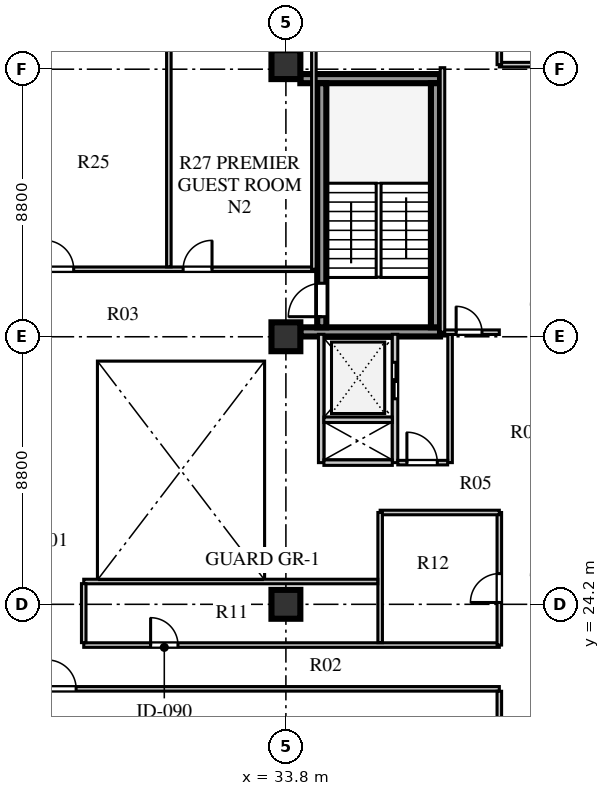
"""IFC4 building model, lengths in metres.
Left out: names, types, materials, properties, quantities, classifications, styles, units other than length and angle.
Written with IfcOpenShell. Run it as: python <this file> out.ifc"""

import sys

from ifc_helpers import new_model, si_unit, direction, frame, frame_2d, origin, origin_2d, place, context, subcontext, project, spatial, rectangle, extrude, element, fill, save


model = new_model("IFC4")
c1 = context("Model", 3, precision=1e-05, world=origin(), true_north=direction((0.0, 1.0)))
c2 = subcontext(c1, "Body", "Model", "MODEL_VIEW")
j1 = project(units=[si_unit("LENGTHUNIT", "METRE"), si_unit("PLANEANGLEUNIT", "RADIAN")], contexts=[c1])
p1 = place(None, origin())
s1 = spatial("IfcSite", under=j1, at=p1, CompositionType="ELEMENT")
p2 = place(p1, origin())
s2 = spatial("IfcBuilding", under=s1, at=p2, CompositionType="ELEMENT")
p3 = place(p2, frame((0.0, 0.0, 196.4)))
s3 = spatial("IfcBuildingStorey", under=s2, at=p3, CompositionType="ELEMENT", Elevation=196.4)
for number, where, z_axis, x_axis in (
    (1, (34.275, 33.16, 0.0), (0.0, 0.0, 1.0), (1.0, 0.0, 0.0)),
    (2, (34.275, 41.49, 0.0), (0.0, 0.0, 1.0), (1.0, 0.0, 0.0)),
):
    element("IfcWall", number, at=place(p3, frame(where, z_axis=z_axis, x_axis=x_axis)), inside=s3, PredefinedType="SHEAR", context=c2, shape_type="SweptSolid", body=[
        extrude(rectangle(XDim=4.595, YDim=0.3, at=frame_2d((2.298, 0.0))), origin(), (0.0, 0.0, 1.0), 3.6),
    ])
p4 = place(p3, frame((34.98, 33.31, 0.0), z_axis=(0.0, 0.0, 1.0), x_axis=(0.0, 1.0, 0.0)))
e3 = element("IfcWall", 3, at=p4, inside=s3, PredefinedType="SHEAR", context=c2, shape_type="SweptSolid", body=[
    extrude(rectangle(XDim=8.03, YDim=0.3, at=frame_2d((4.015, 0.0))), origin(), (0.0, 0.0, 1.0), 3.6),
])
p5 = place(p4, frame((0.35, 0.0, 0.0)))
e4 = element("IfcOpeningElement", 4, at=p5, cuts=e3, PredefinedType="OPENING", context=c2, shape_type="SweptSolid", body=[
    extrude(rectangle(XDim=1.1, YDim=2.1, at=frame_2d((0.55, 1.05))), frame((0.0, 0.16, 0.0), z_axis=(0.0, -1.0, 0.0), x_axis=(1.0, 0.0, 0.0)), (0.0, 0.0, 1.0), 0.32),
])
p6 = place(p3, frame((38.72, 33.31, 0.0), z_axis=(0.0, 0.0, 1.0), x_axis=(0.0, 1.0, 0.0)))
e5 = element("IfcWall", 5, at=p6, inside=s3, PredefinedType="SHEAR", context=c2, shape_type="SweptSolid", body=[
    extrude(rectangle(XDim=8.03, YDim=0.3, at=frame_2d((4.015, 0.0))), origin(), (0.0, 0.0, 1.0), 3.6),
])
for number, where, z_axis, x_axis in (
    (6, (33.8, 24.2, 0.0), (0.0, 0.0, 1.0), (1.0, 0.0, 0.0)),
    (7, (33.8, 33.0, 0.0), (0.0, 0.0, 1.0), (1.0, 0.0, 0.0)),
    (8, (33.8, 41.95, 0.0), (0.0, 0.0, 1.0), (1.0, 0.0, 0.0)),
):
    element("IfcColumn", number, at=place(p3, frame(where, z_axis=z_axis, x_axis=x_axis)), inside=s3, PredefinedType="COLUMN", context=c2, shape_type="SweptSolid", body=[
        extrude(rectangle(XDim=0.95, YDim=0.95, at=origin_2d()), origin(), (0.0, 0.0, 1.0), 3.6),
    ])
p7 = place(p3, frame((34.96, 28.86, 0.0), z_axis=(0.0, 0.0, 1.0), x_axis=(0.0, 1.0, 0.0)))
e9 = element("IfcWall", 9, at=p7, inside=s3, PredefinedType="SOLIDWALL", context=c2, shape_type="SweptSolid", body=[
    extrude(rectangle(XDim=4.22, YDim=0.18, at=frame_2d((2.11, 0.0))), origin(), (0.0, 0.0, 1.0), 3.6),
])
p8 = place(p3, frame((37.39, 28.86, 0.0), z_axis=(0.0, 0.0, 1.0), x_axis=(0.0, 1.0, 0.0)))
e10 = element("IfcWall", 10, at=p8, inside=s3, PredefinedType="SOLIDWALL", context=c2, shape_type="SweptSolid", body=[
    extrude(rectangle(XDim=4.22, YDim=0.18, at=frame_2d((2.11, 0.0))), origin(), (0.0, 0.0, 1.0), 3.6),
])
p9 = place(p8, frame((2.1, 0.0, 0.0)))
e11 = element("IfcOpeningElement", 11, at=p9, cuts=e10, PredefinedType="OPENING", context=c2, shape_type="SweptSolid", body=[
    extrude(rectangle(XDim=1.2, YDim=2.12, at=frame_2d((0.6, 1.06))), frame((0.0, 0.1, 0.0), z_axis=(0.0, -1.0, 0.0), x_axis=(1.0, 0.0, 0.0)), (0.0, 0.0, 1.0), 0.2),
])
for number, where, z_axis, x_axis in (
    (12, (35.05, 28.86, 0.0), (0.0, 0.0, 1.0), (1.0, 0.0, 0.0)),
    (13, (35.05, 30.27, 0.0), (0.0, 0.0, 1.0), (1.0, 0.0, 0.0)),
):
    element("IfcWall", number, at=place(p3, frame(where, z_axis=z_axis, x_axis=x_axis)), inside=s3, PredefinedType="SOLIDWALL", context=c2, shape_type="SweptSolid", body=[
        extrude(rectangle(XDim=2.25, YDim=0.18, at=frame_2d((1.125, 0.0))), origin(), (0.0, 0.0, 1.0), 3.6),
    ])
p10 = place(p3, frame((39.2, 28.86, 0.0), z_axis=(0.0, 0.0, 1.0), x_axis=(0.0, 1.0, 0.0)))
e14 = element("IfcWall", 14, at=p10, inside=s3, PredefinedType="PARTITIONING", context=c2, shape_type="SweptSolid", body=[
    extrude(rectangle(XDim=4.22, YDim=0.15, at=frame_2d((2.11, 0.0))), origin(), (0.0, 0.0, 1.0), 3.6),
])
p11 = place(p3, frame((37.48, 28.86, 0.0), z_axis=(0.0, 0.0, 1.0), x_axis=(1.0, 0.0, 0.0)))
e15 = element("IfcWall", 15, at=p11, inside=s3, PredefinedType="PARTITIONING", context=c2, shape_type="SweptSolid", body=[
    extrude(rectangle(XDim=1.64, YDim=0.15, at=frame_2d((0.82, 0.0))), origin(), (0.0, 0.0, 1.0), 3.6),
])
p12 = place(p11, frame((0.3, 0.0, 0.0)))
e16 = element("IfcOpeningElement", 16, at=p12, cuts=e15, PredefinedType="OPENING", context=c2, shape_type="SweptSolid", body=[
    extrude(rectangle(XDim=1.0, YDim=2.1, at=frame_2d((0.5, 1.05))), frame((0.0, 0.085, 0.0), z_axis=(0.0, -1.0, 0.0), x_axis=(1.0, 0.0, 0.0)), (0.0, 0.0, 1.0), 0.17),
])
p13 = place(p3, frame((25.22, 21.42, 0.0), z_axis=(0.0, 0.0, 1.0), x_axis=(1.0, 0.0, 0.0)))
e17 = element("IfcWall", 17, at=p13, inside=s3, PredefinedType="PARTITIONING", context=c2, shape_type="SweptSolid", body=[
    extrude(rectangle(XDim=15.6, YDim=0.15, at=frame_2d((7.8, 0.0))), origin(), (0.0, 0.0, 1.0), 3.25),
])
p14 = place(p13, frame((0.73, 0.0, 0.0)))
e18 = element("IfcOpeningElement", 18, at=p14, cuts=e17, PredefinedType="OPENING", context=c2, shape_type="SweptSolid", body=[
    extrude(rectangle(XDim=0.95, YDim=2.1, at=frame_2d((0.475, 1.05))), frame((0.0, 0.085, 0.0), z_axis=(0.0, -1.0, 0.0), x_axis=(1.0, 0.0, 0.0)), (0.0, 0.0, 1.0), 0.17),
])
p15 = place(p3, frame((27.15, 22.86, 0.0), z_axis=(0.0, 0.0, 1.0), x_axis=(1.0, 0.0, 0.0)))
e19 = element("IfcWall", 19, at=p15, inside=s3, PredefinedType="PARTITIONING", context=c2, shape_type="SweptSolid", body=[
    extrude(rectangle(XDim=13.67, YDim=0.15, at=frame_2d((6.835, 0.0))), origin(), (0.0, 0.0, 1.0), 3.6),
])
p16 = place(p15, frame((2.2, 0.0, 0.0)))
e20 = element("IfcOpeningElement", 20, at=p16, cuts=e19, PredefinedType="OPENING", context=c2, shape_type="SweptSolid", body=[
    extrude(rectangle(XDim=0.9, YDim=2.08, at=frame_2d((0.45, 1.04))), frame((0.0, 0.085, 0.0), z_axis=(0.0, -1.0, 0.0), x_axis=(1.0, 0.0, 0.0)), (0.0, 0.0, 1.0), 0.17),
])
p17 = place(p3, frame((25.22, 35.22, 0.0), z_axis=(0.0, 0.0, 1.0), x_axis=(1.0, 0.0, 0.0)))
e21 = element("IfcWall", 21, at=p17, inside=s3, PredefinedType="PARTITIONING", context=c2, shape_type="SweptSolid", body=[
    extrude(rectangle(XDim=9.5, YDim=0.15, at=frame_2d((4.75, 0.0))), origin(), (0.0, 0.0, 1.0), 3.6),
])
p18 = place(p17, frame((0.65, 0.0, 0.0)))
e22 = element("IfcOpeningElement", 22, at=p18, cuts=e21, PredefinedType="OPENING", context=c2, shape_type="SweptSolid", body=[
    extrude(rectangle(XDim=0.95, YDim=2.1, at=frame_2d((0.475, 1.05))), frame((0.0, 0.085, 0.0), z_axis=(0.0, -1.0, 0.0), x_axis=(1.0, 0.0, 0.0)), (0.0, 0.0, 1.0), 0.17),
])
p19 = place(p17, frame((5.2, 0.0, 0.0)))
e23 = element("IfcOpeningElement", 23, at=p19, cuts=e21, PredefinedType="OPENING", context=c2, shape_type="SweptSolid", body=[
    extrude(rectangle(XDim=0.95, YDim=2.1, at=frame_2d((0.475, 1.05))), frame((0.0, 0.085, 0.0), z_axis=(0.0, -1.0, 0.0), x_axis=(1.0, 0.0, 0.0)), (0.0, 0.0, 1.0), 0.17),
])
p20 = place(p3, frame((40.82, 41.95, 0.0), z_axis=(0.0, 0.0, 1.0), x_axis=(1.0, 0.0, 0.0)))
e24 = element("IfcWall", 24, at=p20, inside=s3, PredefinedType="PARTITIONING", context=c2, shape_type="SweptSolid", body=[
    extrude(rectangle(XDim=9.7, YDim=0.15, at=frame_2d((4.85, 0.0))), origin(), (0.0, 0.0, 1.0), 2.95),
])
p21 = place(p3, frame((40.82, 22.86, 0.0), z_axis=(0.0, 0.0, 1.0), x_axis=(0.0, 1.0, 0.0)))
e25 = element("IfcWall", 25, at=p21, inside=s3, PredefinedType="PARTITIONING", context=c2, shape_type="SweptSolid", body=[
    extrude(rectangle(XDim=4.36, YDim=0.15, at=frame_2d((2.18, 0.0))), origin(), (0.0, 0.0, 1.0), 3.6),
])
p22 = place(p21, frame((1.4, 0.0, 0.0)))
e26 = element("IfcOpeningElement", 26, at=p22, cuts=e25, PredefinedType="OPENING", context=c2, shape_type="SweptSolid", body=[
    extrude(rectangle(XDim=0.95, YDim=2.1, at=frame_2d((0.475, 1.05))), frame((0.0, 0.085, 0.0), z_axis=(0.0, -1.0, 0.0), x_axis=(1.0, 0.0, 0.0)), (0.0, 0.0, 1.0), 0.17),
])
p23 = place(p3, frame((36.9, 27.22, 0.0), z_axis=(0.0, 0.0, 1.0), x_axis=(1.0, 0.0, 0.0)))
e27 = element("IfcWall", 27, at=p23, inside=s3, PredefinedType="PARTITIONING", context=c2, shape_type="SweptSolid", body=[
    extrude(rectangle(XDim=3.92, YDim=0.15, at=frame_2d((1.96, 0.0))), origin(), (0.0, 0.0, 1.0), 3.25),
])
p24 = place(p3, frame((36.9, 22.94, 0.0), z_axis=(0.0, 0.0, 1.0), x_axis=(0.0, 1.0, 0.0)))
e28 = element("IfcWall", 28, at=p24, inside=s3, PredefinedType="PARTITIONING", context=c2, shape_type="SweptSolid", body=[
    extrude(rectangle(XDim=4.28, YDim=0.15, at=frame_2d((2.14, 0.0))), origin(), (0.0, 0.0, 1.0), 3.6),
])
p25 = place(p3, frame((27.15, 24.95, 0.0), z_axis=(0.0, 0.0, 1.0), x_axis=(1.0, 0.0, 0.0)))
e29 = element("IfcWall", 29, at=p25, inside=s3, PredefinedType="PARTITIONING", context=c2, shape_type="SweptSolid", body=[
    extrude(rectangle(XDim=9.67, YDim=0.15, at=frame_2d((4.835, 0.0))), origin(), (0.0, 0.0, 1.0), 3.05),
])
p26 = place(p3, frame((27.15, 22.94, 0.0), z_axis=(0.0, 0.0, 1.0), x_axis=(0.0, 1.0, 0.0)))
e30 = element("IfcWall", 30, at=p26, inside=s3, PredefinedType="PARTITIONING", context=c2, shape_type="SweptSolid", body=[
    extrude(rectangle(XDim=1.94, YDim=0.15, at=frame_2d((0.97, 0.0))), origin(), (0.0, 0.0, 1.0), 3.6),
])
p27 = place(p3, frame((40.82, 7.88, 0.0), z_axis=(0.0, 0.0, 1.0), x_axis=(0.0, 1.0, 0.0)))
e31 = element("IfcWall", 31, at=p27, inside=s3, PredefinedType="PARTITIONING", context=c2, shape_type="SweptSolid", body=[
    extrude(rectangle(XDim=13.46, YDim=0.15, at=frame_2d((6.73, 0.0))), origin(), (0.0, 0.0, 1.0), 3.6),
])
p28 = place(p3, frame((34.72, 35.22, 0.0), z_axis=(0.0, 0.0, 1.0), x_axis=(0.0, 1.0, 0.0)))
e32 = element("IfcWall", 32, at=p28, inside=s3, PredefinedType="PARTITIONING", context=c2, shape_type="SweptSolid", body=[
    extrude(rectangle(XDim=14.1, YDim=0.15, at=frame_2d((7.05, 0.0))), origin(), (0.0, 0.0, 1.0), 3.6),
])
p29 = place(p3, frame((29.95, 35.3, 0.0), z_axis=(0.0, 0.0, 1.0), x_axis=(0.0, 1.0, 0.0)))
e33 = element("IfcWall", 33, at=p29, inside=s3, PredefinedType="PARTITIONING", context=c2, shape_type="SweptSolid", body=[
    extrude(rectangle(XDim=14.02, YDim=0.15, at=frame_2d((7.01, 0.0))), origin(), (0.0, 0.0, 1.0), 3.6),
])
p30 = place(p3, frame((38.95, 33.15, 0.0), z_axis=(0.0, 0.0, 1.0), x_axis=(1.0, 0.0, 0.0)))
e34 = element("IfcWall", 34, at=p30, inside=s3, PredefinedType="PARTITIONING", context=c2, shape_type="SweptSolid", body=[
    extrude(rectangle(XDim=1.87, YDim=0.15, at=frame_2d((0.935, 0.0))), origin(), (0.0, 0.0, 1.0), 3.6),
])
p31 = place(p30, frame((0.45, 0.0, 0.0)))
e35 = element("IfcOpeningElement", 35, at=p31, cuts=e34, PredefinedType="OPENING", context=c2, shape_type="SweptSolid", body=[
    extrude(rectangle(XDim=0.85, YDim=2.05, at=frame_2d((0.425, 1.025))), frame((0.0, 0.085, 0.0), z_axis=(0.0, -1.0, 0.0), x_axis=(1.0, 0.0, 0.0)), (0.0, 0.0, 1.0), 0.17),
])
p32 = place(p3, frame((38.95, 33.15, 0.0), z_axis=(0.0, 0.0, 1.0), x_axis=(0.0, 1.0, 0.0)))
e36 = element("IfcWall", 36, at=p32, inside=s3, PredefinedType="PARTITIONING", context=c2, shape_type="SweptSolid", body=[
    extrude(rectangle(XDim=8.7, YDim=0.15, at=frame_2d((4.35, 0.0))), origin(), (0.0, 0.0, 1.0), 3.6),
])
p33 = place(p3, frame((40.82, 41.95, 0.0), z_axis=(0.0, 0.0, 1.0), x_axis=(0.0, 1.0, 0.0)))
e37 = element("IfcWall", 37, at=p33, inside=s3, PredefinedType="PARTITIONING", context=c2, shape_type="SweptSolid", body=[
    extrude(rectangle(XDim=7.37, YDim=0.15, at=frame_2d((3.685, 0.0))), origin(), (0.0, 0.0, 1.0), 3.6),
])
p34 = place(p5, origin())
e38 = element("IfcDoor", 38, at=p34, inside=s3, OperationType="SINGLE_SWING_LEFT", PredefinedType="DOOR", context=c2, shape_type="SweptSolid", body=[
    extrude(rectangle(XDim=1.1, YDim=2.1, at=frame_2d((0.55, 1.05))), frame((0.0, 0.025, 0.0), z_axis=(0.0, -1.0, 0.0), x_axis=(1.0, 0.0, 0.0)), (0.0, 0.0, 1.0), 0.05),
])
fill(e4, e38)
p35 = place(p9, frame((1.2, 0.0, 0.0), z_axis=(0.0, 0.0, 1.0), x_axis=(-1.0, 0.0, 0.0)))
e39 = element("IfcDoor", 39, at=p35, inside=s3, OperationType="DOUBLE_DOOR_SLIDING", PredefinedType="DOOR", context=c2, shape_type="SweptSolid", body=[
    extrude(rectangle(XDim=1.2, YDim=2.12, at=frame_2d((0.6, 1.06))), frame((0.0, 0.025, 0.0), z_axis=(0.0, -1.0, 0.0), x_axis=(1.0, 0.0, 0.0)), (0.0, 0.0, 1.0), 0.05),
])
fill(e11, e39)
p36 = place(p12, origin())
e40 = element("IfcDoor", 40, at=p36, inside=s3, OperationType="SINGLE_SWING_LEFT", PredefinedType="DOOR", context=c2, shape_type="SweptSolid", body=[
    extrude(rectangle(XDim=1.0, YDim=2.1, at=frame_2d((0.5, 1.05))), frame((0.0, 0.025, 0.0), z_axis=(0.0, -1.0, 0.0), x_axis=(1.0, 0.0, 0.0)), (0.0, 0.0, 1.0), 0.05),
])
fill(e16, e40)
p37 = place(p16, origin())
e41 = element("IfcDoor", 41, at=p37, inside=s3, OperationType="SINGLE_SWING_LEFT", PredefinedType="DOOR", context=c2, shape_type="SweptSolid", body=[
    extrude(rectangle(XDim=0.9, YDim=2.08, at=frame_2d((0.45, 1.04))), frame((0.0, 0.025, 0.0), z_axis=(0.0, -1.0, 0.0), x_axis=(1.0, 0.0, 0.0)), (0.0, 0.0, 1.0), 0.05),
])
fill(e20, e41)
p38 = place(p22, frame((0.95, 0.0, 0.0), z_axis=(0.0, 0.0, 1.0), x_axis=(-1.0, 0.0, 0.0)))
e42 = element("IfcDoor", 42, at=p38, inside=s3, OperationType="SINGLE_SWING_RIGHT", PredefinedType="DOOR", context=c2, shape_type="SweptSolid", body=[
    extrude(rectangle(XDim=0.95, YDim=2.1, at=frame_2d((0.475, 1.05))), frame((0.0, 0.025, 0.0), z_axis=(0.0, -1.0, 0.0), x_axis=(1.0, 0.0, 0.0)), (0.0, 0.0, 1.0), 0.05),
])
fill(e26, e42)
p39 = place(p14, frame((0.95, 0.0, 0.0), z_axis=(0.0, 0.0, 1.0), x_axis=(-1.0, 0.0, 0.0)))
e43 = element("IfcDoor", 43, at=p39, inside=s3, OperationType="SINGLE_SWING_RIGHT", PredefinedType="DOOR", context=c2, shape_type="SweptSolid", body=[
    extrude(rectangle(XDim=0.95, YDim=2.1, at=frame_2d((0.475, 1.05))), frame((0.0, 0.025, 0.0), z_axis=(0.0, -1.0, 0.0), x_axis=(1.0, 0.0, 0.0)), (0.0, 0.0, 1.0), 0.05),
])
fill(e18, e43)
p40 = place(p18, origin())
e44 = element("IfcDoor", 44, at=p40, inside=s3, OperationType="SINGLE_SWING_LEFT", PredefinedType="DOOR", context=c2, shape_type="SweptSolid", body=[
    extrude(rectangle(XDim=0.95, YDim=2.1, at=frame_2d((0.475, 1.05))), frame((0.0, 0.025, 0.0), z_axis=(0.0, -1.0, 0.0), x_axis=(1.0, 0.0, 0.0)), (0.0, 0.0, 1.0), 0.05),
])
fill(e22, e44)
p41 = place(p19, origin())
e45 = element("IfcDoor", 45, at=p41, inside=s3, OperationType="SINGLE_SWING_RIGHT", PredefinedType="DOOR", context=c2, shape_type="SweptSolid", body=[
    extrude(rectangle(XDim=0.95, YDim=2.1, at=frame_2d((0.475, 1.05))), frame((0.0, 0.025, 0.0), z_axis=(0.0, -1.0, 0.0), x_axis=(1.0, 0.0, 0.0)), (0.0, 0.0, 1.0), 0.05),
])
fill(e23, e45)
p42 = place(p31, origin())
e46 = element("IfcDoor", 46, at=p42, inside=s3, OperationType="SINGLE_SWING_LEFT", PredefinedType="DOOR", context=c2, shape_type="SweptSolid", body=[
    extrude(rectangle(XDim=0.85, YDim=2.05, at=frame_2d((0.425, 1.025))), frame((0.0, 0.025, 0.0), z_axis=(0.0, -1.0, 0.0), x_axis=(1.0, 0.0, 0.0)), (0.0, 0.0, 1.0), 0.05),
])
fill(e35, e46)
save(model, sys.argv[1])
